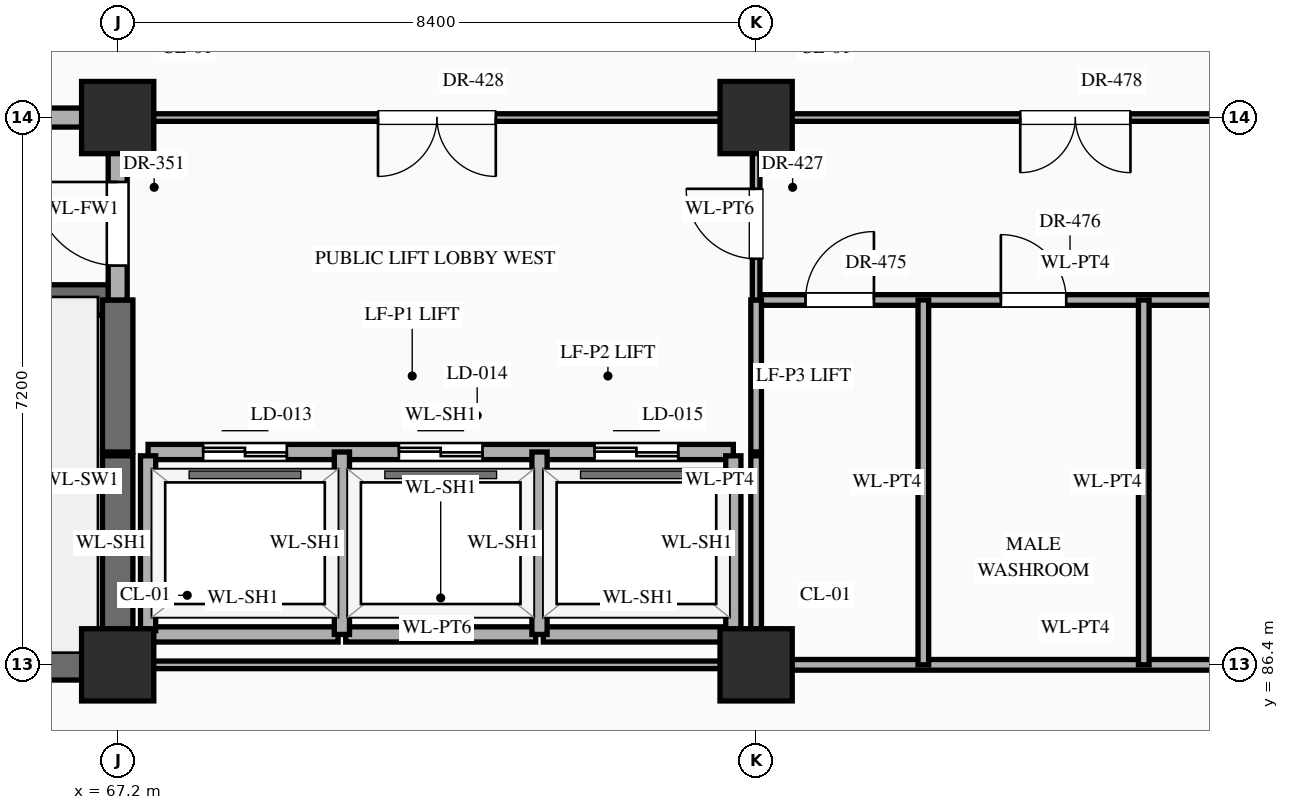
"""IFC4 building model, lengths in metres.
Left out: names, types, materials, properties, quantities, classifications, styles, units other than length and angle.
Written with IfcOpenShell. Run it as: python <this file> out.ifc"""

import sys

from ifc_helpers import new_model, si_unit, direction, frame, frame_2d, origin, origin_2d, place, context, subcontext, project, spatial, rectangle, extrude, element, fill, save


model = new_model("IFC4")
c1 = context("Model", 3, precision=1e-05, world=origin(), true_north=direction((0.0, 1.0)))
c2 = subcontext(c1, "Body", "Model", "MODEL_VIEW")
j1 = project(units=[si_unit("LENGTHUNIT", "METRE"), si_unit("PLANEANGLEUNIT", "RADIAN")], contexts=[c1])
p1 = place(None, origin())
s1 = spatial("IfcSite", under=j1, at=p1, CompositionType="ELEMENT")
p2 = place(p1, origin())
s2 = spatial("IfcBuilding", under=s1, at=p2, CompositionType="ELEMENT")
p3 = place(p2, frame((0.0, 0.0, -5.4)))
s3 = spatial("IfcBuildingStorey", under=s2, at=p3, CompositionType="ELEMENT", Elevation=-5.4)
for number, where, z_axis, x_axis in (
    (1, (67.2, 86.4, 0.0), (0.0, 0.0, 1.0), (1.0, 0.0, 0.0)),
    (2, (67.2, 93.6, 0.0), (0.0, 0.0, 1.0), (1.0, 0.0, 0.0)),
    (3, (75.6, 86.4, 0.0), (0.0, 0.0, 1.0), (1.0, 0.0, 0.0)),
    (4, (75.6, 93.6, 0.0), (0.0, 0.0, 1.0), (1.0, 0.0, 0.0)),
):
    element("IfcColumn", number, at=place(p3, frame(where, z_axis=z_axis, x_axis=x_axis)), inside=s3, PredefinedType="COLUMN", context=c2, shape_type="SweptSolid", body=[
        extrude(rectangle(XDim=0.95, YDim=0.95, at=origin_2d()), origin(), (0.0, 0.0, 1.0), 5.4),
    ])
p4 = place(p3, frame((58.8, 86.4, 0.0), z_axis=(0.0, 0.0, 1.0), x_axis=(1.0, 0.0, 0.0)))
e5 = element("IfcWall", 5, at=p4, inside=s3, PredefinedType="SHEAR", context=c2, shape_type="SweptSolid", body=[
    extrude(rectangle(XDim=8.4, YDim=0.4, at=frame_2d((4.2, 0.0))), origin(), (0.0, 0.0, 1.0), 5.1),
])
p5 = place(p3, frame((67.25, 86.4, 0.0), z_axis=(0.0, 0.0, 1.0), x_axis=(1.0, 0.0, 0.0)))
e6 = element("IfcWall", 6, at=p5, inside=s3, PredefinedType="STANDARD", context=c2, shape_type="SweptSolid", body=[
    extrude(rectangle(XDim=8.3, YDim=0.1, at=frame_2d((4.15, 0.0))), origin(), (0.0, 0.0, 1.0), 4.25),
])
p6 = place(p3, frame((75.6, 86.4, 0.0), z_axis=(0.0, 0.0, 1.0), x_axis=(1.0, 0.0, 0.0)))
e7 = element("IfcWall", 7, at=p6, inside=s3, PredefinedType="STANDARD", context=c2, shape_type="SweptSolid", body=[
    extrude(rectangle(XDim=8.4, YDim=0.14, at=frame_2d((4.2, 0.0))), origin(), (0.0, 0.0, 1.0), 4.25),
])
for number, where, z_axis, x_axis in (
    (8, (67.6, 86.8, 0.0), (0.0, 0.0, 1.0), (1.0, 0.0, 0.0)),
    (9, (70.2, 86.8, 0.0), (0.0, 0.0, 1.0), (1.0, 0.0, 0.0)),
    (10, (72.8, 86.8, 0.0), (0.0, 0.0, 1.0), (1.0, 0.0, 0.0)),
):
    element("IfcWall", number, at=place(p3, frame(where, z_axis=z_axis, x_axis=x_axis)), inside=s3, PredefinedType="STANDARD", context=c2, shape_type="SweptSolid", body=[
        extrude(rectangle(XDim=2.5, YDim=0.2, at=frame_2d((1.25, 0.0))), origin(), (0.0, 0.0, 1.0), 5.1),
    ])
p7 = place(p3, frame((67.6, 89.2, 0.0), z_axis=(0.0, 0.0, 1.0), x_axis=(1.0, 0.0, 0.0)))
e11 = element("IfcWall", 11, at=p7, inside=s3, PredefinedType="STANDARD", context=c2, shape_type="SweptSolid", body=[
    extrude(rectangle(XDim=7.7, YDim=0.2, at=frame_2d((3.85, 0.0))), origin(), (0.0, 0.0, 1.0), 5.1),
])
p8 = place(p7, frame((0.725, 0.0, 0.0)))
e12 = element("IfcOpeningElement", 12, at=p8, cuts=e11, PredefinedType="OPENING", context=c2, shape_type="SweptSolid", body=[
    extrude(rectangle(XDim=1.1, YDim=2.15, at=frame_2d((0.55, 1.075))), frame((0.0, 0.112, 0.0), z_axis=(0.0, -1.0, 0.0), x_axis=(1.0, 0.0, 0.0)), (0.0, 0.0, 1.0), 0.224),
])
p9 = place(p7, frame((3.3, 0.0, 0.0)))
e13 = element("IfcOpeningElement", 13, at=p9, cuts=e11, PredefinedType="OPENING", context=c2, shape_type="SweptSolid", body=[
    extrude(rectangle(XDim=1.1, YDim=2.15, at=frame_2d((0.55, 1.075))), frame((0.0, 0.112, 0.0), z_axis=(0.0, -1.0, 0.0), x_axis=(1.0, 0.0, 0.0)), (0.0, 0.0, 1.0), 0.224),
])
p10 = place(p7, frame((5.875, 0.0, 0.0)))
e14 = element("IfcOpeningElement", 14, at=p10, cuts=e11, PredefinedType="OPENING", context=c2, shape_type="SweptSolid", body=[
    extrude(rectangle(XDim=1.1, YDim=2.15, at=frame_2d((0.55, 1.075))), frame((0.0, 0.112, 0.0), z_axis=(0.0, -1.0, 0.0), x_axis=(1.0, 0.0, 0.0)), (0.0, 0.0, 1.0), 0.224),
])
p11 = place(p3, frame((58.8, 91.2, 0.0), z_axis=(0.0, 0.0, 1.0), x_axis=(1.0, 0.0, 0.0)))
e15 = element("IfcWall", 15, at=p11, inside=s3, PredefinedType="SHEAR", context=c2, shape_type="SweptSolid", body=[
    extrude(rectangle(XDim=8.4, YDim=0.4, at=frame_2d((4.2, 0.0))), origin(), (0.0, 0.0, 1.0), 5.1),
])
p12 = place(p11, frame((0.65, 0.0, 0.0)))
e16 = element("IfcOpeningElement", 16, at=p12, cuts=e15, PredefinedType="OPENING", context=c2, shape_type="SweptSolid", body=[
    extrude(rectangle(XDim=1.1, YDim=2.2, at=frame_2d((0.55, 1.1))), frame((0.0, 0.212, 0.0), z_axis=(0.0, -1.0, 0.0), x_axis=(1.0, 0.0, 0.0)), (0.0, 0.0, 1.0), 0.424),
])
p13 = place(p3, frame((75.6, 91.2, 0.0), z_axis=(0.0, 0.0, 1.0), x_axis=(1.0, 0.0, 0.0)))
e17 = element("IfcWall", 17, at=p13, inside=s3, PredefinedType="STANDARD", context=c2, shape_type="SweptSolid", body=[
    extrude(rectangle(XDim=8.4, YDim=0.14, at=frame_2d((4.2, 0.0))), origin(), (0.0, 0.0, 1.0), 5.1),
])
p14 = place(p13, frame((0.65, 0.0, 0.0)))
e18 = element("IfcOpeningElement", 18, at=p14, cuts=e17, PredefinedType="OPENING", context=c2, shape_type="SweptSolid", body=[
    extrude(rectangle(XDim=0.9, YDim=2.15, at=frame_2d((0.45, 1.075))), frame((0.0, 0.082, 0.0), z_axis=(0.0, -1.0, 0.0), x_axis=(1.0, 0.0, 0.0)), (0.0, 0.0, 1.0), 0.164),
])
p15 = place(p13, frame((3.22, 0.0, 0.0)))
e19 = element("IfcOpeningElement", 19, at=p15, cuts=e17, PredefinedType="OPENING", context=c2, shape_type="SweptSolid", body=[
    extrude(rectangle(XDim=0.86, YDim=2.1, at=frame_2d((0.43, 1.05))), frame((0.0, 0.082, 0.0), z_axis=(0.0, -1.0, 0.0), x_axis=(1.0, 0.0, 0.0)), (0.0, 0.0, 1.0), 0.164),
])
p16 = place(p13, frame((6.32, 0.0, 0.0)))
e20 = element("IfcOpeningElement", 20, at=p16, cuts=e17, PredefinedType="OPENING", context=c2, shape_type="SweptSolid", body=[
    extrude(rectangle(XDim=0.86, YDim=2.1, at=frame_2d((0.43, 1.05))), frame((0.0, 0.082, 0.0), z_axis=(0.0, -1.0, 0.0), x_axis=(1.0, 0.0, 0.0)), (0.0, 0.0, 1.0), 0.164),
])
p17 = place(p3, frame((58.8, 93.6, 0.0), z_axis=(0.0, 0.0, 1.0), x_axis=(1.0, 0.0, 0.0)))
e21 = element("IfcWall", 21, at=p17, inside=s3, PredefinedType="STANDARD", context=c2, shape_type="SweptSolid", body=[
    extrude(rectangle(XDim=8.4, YDim=0.25, at=frame_2d((4.2, 0.0))), origin(), (0.0, 0.0, 1.0), 4.25),
])
p18 = place(p17, frame((3.4, 0.0, 0.0)))
e22 = element("IfcOpeningElement", 22, at=p18, cuts=e21, PredefinedType="OPENING", context=c2, shape_type="SweptSolid", body=[
    extrude(rectangle(XDim=1.6, YDim=2.3, at=frame_2d((0.8, 1.15))), frame((0.0, 0.137, 0.0), z_axis=(0.0, -1.0, 0.0), x_axis=(1.0, 0.0, 0.0)), (0.0, 0.0, 1.0), 0.274),
])
p19 = place(p3, frame((67.2, 93.6, 0.0), z_axis=(0.0, 0.0, 1.0), x_axis=(1.0, 0.0, 0.0)))
e23 = element("IfcWall", 23, at=p19, inside=s3, PredefinedType="STANDARD", context=c2, shape_type="SweptSolid", body=[
    extrude(rectangle(XDim=33.6, YDim=0.1, at=frame_2d((16.8, 0.0))), origin(), (0.0, 0.0, 1.0), 4.25),
])
p20 = place(p19, frame((3.425, 0.0, 0.0)))
e24 = element("IfcOpeningElement", 24, at=p20, cuts=e23, PredefinedType="OPENING", context=c2, shape_type="SweptSolid", body=[
    extrude(rectangle(XDim=1.55, YDim=2.35, at=frame_2d((0.775, 1.175))), frame((0.0, 0.062, 0.0), z_axis=(0.0, -1.0, 0.0), x_axis=(1.0, 0.0, 0.0)), (0.0, 0.0, 1.0), 0.124),
])
p21 = place(p19, frame((28.55, 0.0, 0.0)))
e25 = element("IfcOpeningElement", 25, at=p21, cuts=e23, PredefinedType="OPENING", context=c2, shape_type="SweptSolid", body=[
    extrude(rectangle(XDim=1.7, YDim=2.45, at=frame_2d((0.85, 1.225))), frame((0.0, 0.062, 0.0), z_axis=(0.0, -1.0, 0.0), x_axis=(1.0, 0.0, 0.0)), (0.0, 0.0, 1.0), 0.124),
])
p22 = place(p19, frame((11.875, 0.0, 0.0)))
e26 = element("IfcOpeningElement", 26, at=p22, cuts=e23, PredefinedType="OPENING", context=c2, shape_type="SweptSolid", body=[
    extrude(rectangle(XDim=1.45, YDim=2.3, at=frame_2d((0.725, 1.15))), frame((0.0, 0.062, 0.0), z_axis=(0.0, -1.0, 0.0), x_axis=(1.0, 0.0, 0.0)), (0.0, 0.0, 1.0), 0.124),
])
p23 = place(p19, frame((17.857, 0.0, 0.0)))
e27 = element("IfcOpeningElement", 27, at=p23, cuts=e23, PredefinedType="OPENING", context=c2, shape_type="SweptSolid", body=[
    extrude(rectangle(XDim=1.08, YDim=2.25, at=frame_2d((0.54, 1.125))), frame((0.0, 0.062, 0.0), z_axis=(0.0, -1.0, 0.0), x_axis=(1.0, 0.0, 0.0)), (0.0, 0.0, 1.0), 0.124),
])
p24 = place(p19, frame((20.44, 0.0, 0.0)))
e28 = element("IfcOpeningElement", 28, at=p24, cuts=e23, PredefinedType="OPENING", context=c2, shape_type="SweptSolid", body=[
    extrude(rectangle(XDim=1.12, YDim=2.25, at=frame_2d((0.56, 1.125))), frame((0.0, 0.062, 0.0), z_axis=(0.0, -1.0, 0.0), x_axis=(1.0, 0.0, 0.0)), (0.0, 0.0, 1.0), 0.124),
])
p25 = place(p19, frame((23.022, 0.0, 0.0)))
e29 = element("IfcOpeningElement", 29, at=p25, cuts=e23, PredefinedType="OPENING", context=c2, shape_type="SweptSolid", body=[
    extrude(rectangle(XDim=1.16, YDim=2.3, at=frame_2d((0.58, 1.15))), frame((0.0, 0.062, 0.0), z_axis=(0.0, -1.0, 0.0), x_axis=(1.0, 0.0, 0.0)), (0.0, 0.0, 1.0), 0.124),
])
p26 = place(p3, frame((67.2, 86.45, 0.0), z_axis=(0.0, 0.0, 1.0), x_axis=(0.0, 1.0, 0.0)))
e30 = element("IfcWall", 30, at=p26, inside=s3, PredefinedType="SHEAR", context=c2, shape_type="SweptSolid", body=[
    extrude(rectangle(XDim=2.7, YDim=0.4, at=frame_2d((1.35, 0.0))), origin(), (0.0, 0.0, 1.0), 5.1),
])
p27 = place(p3, frame((67.2, 89.2, 0.0), z_axis=(0.0, 0.0, 1.0), x_axis=(0.0, 1.0, 0.0)))
e31 = element("IfcWall", 31, at=p27, inside=s3, PredefinedType="SHEAR", context=c2, shape_type="SweptSolid", body=[
    extrude(rectangle(XDim=2.0, YDim=0.4, at=frame_2d((1.0, 0.0))), origin(), (0.0, 0.0, 1.0), 5.1),
])
p28 = place(p3, frame((67.2, 91.2, 0.0), z_axis=(0.0, 0.0, 1.0), x_axis=(0.0, 1.0, 0.0)))
e32 = element("IfcWall", 32, at=p28, inside=s3, PredefinedType="STANDARD", context=c2, shape_type="SweptSolid", body=[
    extrude(rectangle(XDim=2.4, YDim=0.25, at=frame_2d((1.2, 0.0))), origin(), (0.0, 0.0, 1.0), 4.35),
])
p29 = place(p28, frame((0.452, 0.0, 0.0)))
e33 = element("IfcOpeningElement", 33, at=p29, cuts=e32, PredefinedType="OPENING", context=c2, shape_type="SweptSolid", body=[
    extrude(rectangle(XDim=1.1, YDim=2.2, at=frame_2d((0.55, 1.1))), frame((0.0, 0.137, 0.0), z_axis=(0.0, -1.0, 0.0), x_axis=(1.0, 0.0, 0.0)), (0.0, 0.0, 1.0), 0.274),
])
p30 = place(p3, frame((67.6, 86.85, 0.0), z_axis=(0.0, 0.0, 1.0), x_axis=(0.0, 1.0, 0.0)))
e34 = element("IfcWall", 34, at=p30, inside=s3, PredefinedType="STANDARD", context=c2, shape_type="SweptSolid", body=[
    extrude(rectangle(XDim=2.3, YDim=0.2, at=frame_2d((1.15, 0.0))), origin(), (0.0, 0.0, 1.0), 5.1),
])
for number, where, z_axis, x_axis in (
    (35, (70.15, 86.8, 0.0), (0.0, 0.0, 1.0), (0.0, 1.0, 0.0)),
    (36, (72.75, 86.8, 0.0), (0.0, 0.0, 1.0), (0.0, 1.0, 0.0)),
):
    element("IfcWall", number, at=place(p3, frame(where, z_axis=z_axis, x_axis=x_axis)), inside=s3, PredefinedType="STANDARD", context=c2, shape_type="SweptSolid", body=[
        extrude(rectangle(XDim=2.4, YDim=0.2, at=frame_2d((1.2, 0.0))), origin(), (0.0, 0.0, 1.0), 5.1),
    ])
p31 = place(p3, frame((75.3, 86.85, 0.0), z_axis=(0.0, 0.0, 1.0), x_axis=(0.0, 1.0, 0.0)))
e37 = element("IfcWall", 37, at=p31, inside=s3, PredefinedType="STANDARD", context=c2, shape_type="SweptSolid", body=[
    extrude(rectangle(XDim=2.3, YDim=0.2, at=frame_2d((1.15, 0.0))), origin(), (0.0, 0.0, 1.0), 5.1),
])
p32 = place(p3, frame((75.6, 86.45, 0.0), z_axis=(0.0, 0.0, 1.0), x_axis=(0.0, 1.0, 0.0)))
e38 = element("IfcWall", 38, at=p32, inside=s3, PredefinedType="STANDARD", context=c2, shape_type="SweptSolid", body=[
    extrude(rectangle(XDim=2.7, YDim=0.14, at=frame_2d((1.35, 0.0))), origin(), (0.0, 0.0, 1.0), 4.35),
])
p33 = place(p3, frame((75.6, 89.2, 0.0), z_axis=(0.0, 0.0, 1.0), x_axis=(0.0, 1.0, 0.0)))
e39 = element("IfcWall", 39, at=p33, inside=s3, PredefinedType="STANDARD", context=c2, shape_type="SweptSolid", body=[
    extrude(rectangle(XDim=2.0, YDim=0.14, at=frame_2d((1.0, 0.0))), origin(), (0.0, 0.0, 1.0), 4.35),
])
p34 = place(p3, frame((75.6, 91.2, 0.0), z_axis=(0.0, 0.0, 1.0), x_axis=(0.0, 1.0, 0.0)))
e40 = element("IfcWall", 40, at=p34, inside=s3, PredefinedType="STANDARD", context=c2, shape_type="SweptSolid", body=[
    extrude(rectangle(XDim=2.4, YDim=0.1, at=frame_2d((1.2, 0.0))), origin(), (0.0, 0.0, 1.0), 4.35),
])
p35 = place(p34, frame((0.542, 0.0, 0.0)))
e41 = element("IfcOpeningElement", 41, at=p35, cuts=e40, PredefinedType="OPENING", context=c2, shape_type="SweptSolid", body=[
    extrude(rectangle(XDim=0.92, YDim=2.15, at=frame_2d((0.46, 1.075))), frame((0.0, 0.062, 0.0), z_axis=(0.0, -1.0, 0.0), x_axis=(1.0, 0.0, 0.0)), (0.0, 0.0, 1.0), 0.124),
])
for number, where, z_axis, x_axis in (
    (42, (77.8, 86.4, 0.0), (0.0, 0.0, 1.0), (0.0, 1.0, 0.0)),
    (43, (80.7, 86.4, 0.0), (0.0, 0.0, 1.0), (0.0, 1.0, 0.0)),
):
    element("IfcWall", number, at=place(p3, frame(where, z_axis=z_axis, x_axis=x_axis)), inside=s3, PredefinedType="STANDARD", context=c2, shape_type="SweptSolid", body=[
        extrude(rectangle(XDim=4.8, YDim=0.14, at=frame_2d((2.4, 0.0))), origin(), (0.0, 0.0, 1.0), 5.1),
    ])
p36 = place(p8, origin())
e44 = element("IfcDoor", 44, at=p36, inside=s3, OperationType="DOUBLE_DOOR_SLIDING", PredefinedType="DOOR", context=c2, shape_type="SweptSolid", body=[
    extrude(rectangle(XDim=1.1, YDim=2.15, at=frame_2d((0.55, 1.075))), frame((0.0, 0.025, 0.0), z_axis=(0.0, -1.0, 0.0), x_axis=(1.0, 0.0, 0.0)), (0.0, 0.0, 1.0), 0.05),
])
fill(e12, e44)
p37 = place(p9, origin())
e45 = element("IfcDoor", 45, at=p37, inside=s3, OperationType="DOUBLE_DOOR_SLIDING", PredefinedType="DOOR", context=c2, shape_type="SweptSolid", body=[
    extrude(rectangle(XDim=1.1, YDim=2.15, at=frame_2d((0.55, 1.075))), frame((0.0, 0.025, 0.0), z_axis=(0.0, -1.0, 0.0), x_axis=(1.0, 0.0, 0.0)), (0.0, 0.0, 1.0), 0.05),
])
fill(e13, e45)
p38 = place(p10, origin())
e46 = element("IfcDoor", 46, at=p38, inside=s3, OperationType="DOUBLE_DOOR_SLIDING", PredefinedType="DOOR", context=c2, shape_type="SweptSolid", body=[
    extrude(rectangle(XDim=1.1, YDim=2.15, at=frame_2d((0.55, 1.075))), frame((0.0, 0.025, 0.0), z_axis=(0.0, -1.0, 0.0), x_axis=(1.0, 0.0, 0.0)), (0.0, 0.0, 1.0), 0.05),
])
fill(e14, e46)
p39 = place(p29, origin())
e47 = element("IfcDoor", 47, at=p39, inside=s3, OperationType="SINGLE_SWING_RIGHT", PredefinedType="DOOR", context=c2, shape_type="SweptSolid", body=[
    extrude(rectangle(XDim=1.1, YDim=2.2, at=frame_2d((0.55, 1.1))), frame((0.0, 0.025, 0.0), z_axis=(0.0, -1.0, 0.0), x_axis=(1.0, 0.0, 0.0)), (0.0, 0.0, 1.0), 0.05),
])
fill(e33, e47)
p40 = place(p35, origin())
e48 = element("IfcDoor", 48, at=p40, inside=s3, OperationType="SINGLE_SWING_RIGHT", PredefinedType="DOOR", context=c2, shape_type="SweptSolid", body=[
    extrude(rectangle(XDim=0.92, YDim=2.15, at=frame_2d((0.46, 1.075))), frame((0.0, 0.025, 0.0), z_axis=(0.0, -1.0, 0.0), x_axis=(1.0, 0.0, 0.0)), (0.0, 0.0, 1.0), 0.05),
])
fill(e41, e48)
p41 = place(p20, frame((1.55, 0.0, 0.0), z_axis=(0.0, 0.0, 1.0), x_axis=(-1.0, 0.0, 0.0)))
e49 = element("IfcDoor", 49, at=p41, inside=s3, OperationType="DOUBLE_DOOR_SINGLE_SWING", PredefinedType="DOOR", context=c2, shape_type="SweptSolid", body=[
    extrude(rectangle(XDim=1.55, YDim=2.35, at=frame_2d((0.775, 1.175))), frame((0.0, 0.025, 0.0), z_axis=(0.0, -1.0, 0.0), x_axis=(1.0, 0.0, 0.0)), (0.0, 0.0, 1.0), 0.05),
])
fill(e24, e49)
p42 = place(p14, origin())
e50 = element("IfcDoor", 50, at=p42, inside=s3, OperationType="SINGLE_SWING_RIGHT", PredefinedType="DOOR", context=c2, shape_type="SweptSolid", body=[
    extrude(rectangle(XDim=0.9, YDim=2.15, at=frame_2d((0.45, 1.075))), frame((0.0, 0.025, 0.0), z_axis=(0.0, -1.0, 0.0), x_axis=(1.0, 0.0, 0.0)), (0.0, 0.0, 1.0), 0.05),
])
fill(e18, e50)
p43 = place(p15, origin())
e51 = element("IfcDoor", 51, at=p43, inside=s3, OperationType="SINGLE_SWING_LEFT", PredefinedType="DOOR", context=c2, shape_type="SweptSolid", body=[
    extrude(rectangle(XDim=0.86, YDim=2.1, at=frame_2d((0.43, 1.05))), frame((0.0, 0.025, 0.0), z_axis=(0.0, -1.0, 0.0), x_axis=(1.0, 0.0, 0.0)), (0.0, 0.0, 1.0), 0.05),
])
fill(e19, e51)
p44 = place(p22, frame((1.45, 0.0, 0.0), z_axis=(0.0, 0.0, 1.0), x_axis=(-1.0, 0.0, 0.0)))
e52 = element("IfcDoor", 52, at=p44, inside=s3, OperationType="DOUBLE_DOOR_SINGLE_SWING", PredefinedType="DOOR", context=c2, shape_type="SweptSolid", body=[
    extrude(rectangle(XDim=1.45, YDim=2.3, at=frame_2d((0.725, 1.15))), frame((0.0, 0.025, 0.0), z_axis=(0.0, -1.0, 0.0), x_axis=(1.0, 0.0, 0.0)), (0.0, 0.0, 1.0), 0.05),
])
fill(e26, e52)
save(model, sys.argv[1])
